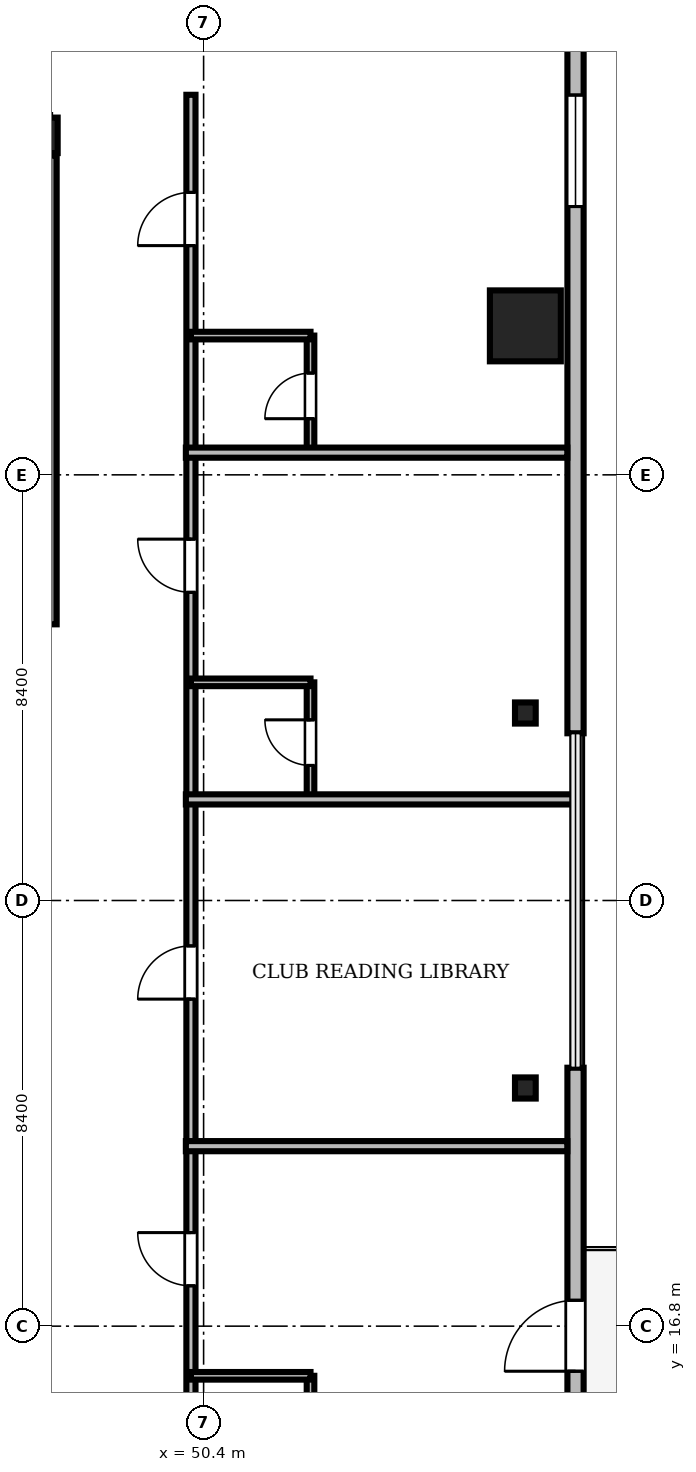
"""IFC4 building model, lengths in metres.
Left out: names, types, materials, properties, quantities, classifications, styles, units other than length and angle.
Written with IfcOpenShell. Run it as: python <this file> out.ifc"""

import sys

from ifc_helpers import new_model, si_unit, direction, frame, frame_2d, origin, origin_2d, place, context, subcontext, project, spatial, rectangle, i_section, extrude, source, transform, mapped, element, fill, save


model = new_model("IFC4")
c1 = context("Model", 3, precision=1e-05, world=origin(), true_north=direction((0.0, 1.0)))
c2 = subcontext(c1, "Body", "Model", "MODEL_VIEW")
j1 = project(units=[si_unit("LENGTHUNIT", "METRE"), si_unit("PLANEANGLEUNIT", "RADIAN")], contexts=[c1])
p1 = place(None, origin())
s1 = spatial("IfcSite", under=j1, at=p1, CompositionType="ELEMENT")
p2 = place(p1, origin())
s2 = spatial("IfcBuilding", under=s1, at=p2, CompositionType="ELEMENT")
p3 = place(p2, frame((0.0, 0.0, 214.8)))
s3 = spatial("IfcBuildingStorey", under=s2, at=p3, CompositionType="ELEMENT", Elevation=214.8)
m1 = source(origin(), c2, "Body", "SweptSolid", [
    extrude(i_section(OverallWidth=0.3, OverallDepth=0.7, WebThickness=0.017, FlangeThickness=0.032, FilletRadius=0.027, at=origin_2d()), origin(), (0.0, 0.0, 1.0), 3.53),
])
p4 = place(p3, frame((47.37, 40.3, 0.0), z_axis=(0.0, 0.0, 1.0), x_axis=(1.0, 0.0, 0.0)))
e1 = element("IfcColumn", 1, at=p4, inside=s3, PredefinedType="COLUMN", context=c2, shape_type="MappedRepresentation", body=[
    mapped(m1, transform((0.0, 0.0, 0.0), scale=1.0)),
])
m2 = source(origin(), c2, "Body", "SweptSolid", [
    extrude(rectangle(XDim=1.4, YDim=1.4, at=origin_2d()), origin(), (0.0, 0.0, 1.0), 3.53),
])
p5 = place(p3, frame((56.75, 36.54, 0.0), z_axis=(0.0, 0.0, 1.0), x_axis=(1.0, 0.0, 0.0)))
e2 = element("IfcColumn", 2, at=p5, inside=s3, PredefinedType="COLUMN", context=c2, shape_type="MappedRepresentation", body=[
    mapped(m2, transform((0.0, 0.0, 0.0), scale=1.0)),
])
m3 = source(origin(), c2, "Body", "SweptSolid", [
    extrude(i_section(OverallWidth=0.409, OverallDepth=0.417, WebThickness=0.021, FlangeThickness=0.033, FilletRadius=0.015, at=origin_2d()), origin(), (0.0, 0.0, 1.0), 3.53),
])
for number, where, z_axis, x_axis in (
    (3, (56.75, 21.5, 0.0), (0.0, 0.0, 1.0), (1.0, 0.0, 0.0)),
    (4, (56.75, 28.9, 0.0), (0.0, 0.0, 1.0), (1.0, 0.0, 0.0)),
):
    element("IfcColumn", number, at=place(p3, frame(where, z_axis=z_axis, x_axis=x_axis)), inside=s3, PredefinedType="COLUMN", context=c2, shape_type="MappedRepresentation", body=[
        mapped(m3, transform((0.0, 0.0, 0.0), scale=1.0)),
    ])
m4 = source(origin(), c2, "Body", "SweptSolid", [
    extrude(rectangle(XDim=15.6, YDim=0.32, at=frame_2d((7.8, 0.0))), origin(), (0.0, 0.0, 1.0), 3.53),
])
p6 = place(p3, frame((57.74, 6.3, 0.0), z_axis=(0.0, 0.0, 1.0), x_axis=(0.0, 1.0, 0.0)))
e5 = element("IfcWall", 5, at=p6, inside=s3, PredefinedType="SOLIDWALL", context=c2, shape_type="MappedRepresentation", body=[
    mapped(m4, transform((0.0, 0.0, 0.0), scale=1.0)),
])
m5 = source(origin(), c2, "Body", "SweptSolid", [
    extrude(rectangle(XDim=1.4, YDim=2.3, at=frame_2d((0.7, 1.15))), frame((0.0, 0.17, 0.0), z_axis=(0.0, -1.0, 0.0), x_axis=(1.0, 0.0, 0.0)), (0.0, 0.0, 1.0), 0.34),
])
p7 = place(p6, frame((9.61, 0.0, 0.0)))
e6 = element("IfcOpeningElement", 6, at=p7, cuts=e5, PredefinedType="OPENING", context=c2, shape_type="MappedRepresentation", body=[
    mapped(m5, transform((0.0, 0.0, 0.0), scale=1.0)),
])
m6 = source(origin(), c2, "Body", "SweptSolid", [
    extrude(rectangle(XDim=2.2, YDim=2.4, at=frame_2d((1.1, 1.2))), frame((0.0, 0.17, 0.0), z_axis=(0.0, -1.0, 0.0), x_axis=(1.0, 0.0, 0.0)), (0.0, 0.0, 1.0), 0.34),
])
p8 = place(p6, frame((3.005, 0.0, 0.72)))
e7 = element("IfcOpeningElement", 7, at=p8, cuts=e5, PredefinedType="OPENING", context=c2, shape_type="MappedRepresentation", body=[
    mapped(m6, transform((0.0, 0.0, 0.0), scale=1.0)),
])
m7 = source(origin(), c2, "Body", "SweptSolid", [
    extrude(rectangle(XDim=15.6, YDim=0.32, at=frame_2d((7.8, 0.0))), origin(), (0.0, 0.0, 1.0), 3.53),
])
p9 = place(p3, frame((57.74, 28.5, 0.0), z_axis=(0.0, 0.0, 1.0), x_axis=(0.0, 1.0, 0.0)))
e8 = element("IfcWall", 8, at=p9, inside=s3, PredefinedType="SOLIDWALL", context=c2, shape_type="MappedRepresentation", body=[
    mapped(m7, transform((0.0, 0.0, 0.0), scale=1.0)),
])
p10 = place(p9, frame((10.395, 0.0, 0.72)))
e9 = element("IfcOpeningElement", 9, at=p10, cuts=e8, PredefinedType="OPENING", context=c2, shape_type="MappedRepresentation", body=[
    mapped(m6, transform((0.0, 0.0, 0.0), scale=1.0)),
])
m8 = source(origin(), c2, "Body", "SweptSolid", [
    extrude(rectangle(XDim=9.25, YDim=0.25, at=frame_2d((4.625, 0.0))), origin(), (0.0, 0.0, 1.0), 3.55),
])
p11 = place(p3, frame((47.375, 30.65, 0.0), z_axis=(0.0, 0.0, 1.0), x_axis=(0.0, 1.0, 0.0)))
e10 = element("IfcWall", 10, at=p11, inside=s3, PredefinedType="SOLIDWALL", context=c2, shape_type="MappedRepresentation", body=[
    mapped(m8, transform((0.0, 0.0, 0.0), scale=1.0)),
])
m9 = source(origin(), c2, "Body", "SweptSolid", [
    extrude(rectangle(XDim=27.59, YDim=0.18, at=frame_2d((13.795, 0.0))), origin(), (0.0, 0.0, 1.0), 2.972),
])
p12 = place(p3, frame((50.15, 13.51, 0.0), z_axis=(0.0, 0.0, 1.0), x_axis=(0.0, 1.0, 0.0)))
e11 = element("IfcWall", 11, at=p12, inside=s3, PredefinedType="PARTITIONING", context=c2, shape_type="MappedRepresentation", body=[
    mapped(m9, transform((0.0, 0.0, 0.0), scale=1.0)),
])
m10 = source(origin(), c2, "Body", "SweptSolid", [
    extrude(rectangle(XDim=1.05, YDim=2.2, at=frame_2d((0.525, 1.1))), frame((0.0, 0.1, 0.0), z_axis=(0.0, -1.0, 0.0), x_axis=(1.0, 0.0, 0.0)), (0.0, 0.0, 1.0), 0.2),
])
p13 = place(p12, frame((4.086, 0.0, 0.0)))
e12 = element("IfcOpeningElement", 12, at=p13, cuts=e11, PredefinedType="OPENING", context=c2, shape_type="MappedRepresentation", body=[
    mapped(m10, transform((0.0, 0.0, 0.0), scale=1.0)),
])
p14 = place(p12, frame((9.744, 0.0, 0.0)))
e13 = element("IfcOpeningElement", 13, at=p14, cuts=e11, PredefinedType="OPENING", context=c2, shape_type="MappedRepresentation", body=[
    mapped(m10, transform((0.0, 0.0, 0.0), scale=1.0)),
])
p15 = place(p12, frame((17.771, 0.0, 0.0)))
e14 = element("IfcOpeningElement", 14, at=p15, cuts=e11, PredefinedType="OPENING", context=c2, shape_type="MappedRepresentation", body=[
    mapped(m10, transform((0.0, 0.0, 0.0), scale=1.0)),
])
p16 = place(p12, frame((24.614, 0.0, 0.0)))
e15 = element("IfcOpeningElement", 15, at=p16, cuts=e11, PredefinedType="OPENING", context=c2, shape_type="MappedRepresentation", body=[
    mapped(m10, transform((0.0, 0.0, 0.0), scale=1.0)),
])
m11 = source(origin(), c2, "Body", "SweptSolid", [
    extrude(rectangle(XDim=2.29, YDim=0.15, at=frame_2d((1.145, 0.0))), origin(), (0.0, 0.0, 1.0), 2.972),
])
p17 = place(p3, frame((52.51, 13.53, 0.0), z_axis=(0.0, 0.0, 1.0), x_axis=(0.0, 1.0, 0.0)))
e16 = element("IfcWall", 16, at=p17, inside=s3, PredefinedType="PARTITIONING", context=c2, shape_type="MappedRepresentation", body=[
    mapped(m11, transform((0.0, 0.0, 0.0), scale=1.0)),
])
m12 = source(origin(), c2, "Body", "SweptSolid", [
    extrude(rectangle(XDim=0.9, YDim=2.1, at=frame_2d((0.45, 1.05))), frame((0.0, 0.085, 0.0), z_axis=(0.0, -1.0, 0.0), x_axis=(1.0, 0.0, 0.0)), (0.0, 0.0, 1.0), 0.17),
])
p18 = place(p17, frame((0.65, 0.0, 0.0)))
e17 = element("IfcOpeningElement", 17, at=p18, cuts=e16, PredefinedType="OPENING", context=c2, shape_type="MappedRepresentation", body=[
    mapped(m12, transform((0.0, 0.0, 0.0), scale=1.0)),
])
m13 = source(origin(), c2, "Body", "SweptSolid", [
    extrude(rectangle(XDim=2.29, YDim=0.15, at=frame_2d((1.145, 0.0))), origin(), (0.0, 0.0, 1.0), 2.972),
])
p19 = place(p3, frame((52.51, 27.215, 0.0), z_axis=(0.0, 0.0, 1.0), x_axis=(0.0, 1.0, 0.0)))
e18 = element("IfcWall", 18, at=p19, inside=s3, PredefinedType="PARTITIONING", context=c2, shape_type="MappedRepresentation", body=[
    mapped(m13, transform((0.0, 0.0, 0.0), scale=1.0)),
])
p20 = place(p19, frame((0.65, 0.0, 0.0)))
e19 = element("IfcOpeningElement", 19, at=p20, cuts=e18, PredefinedType="OPENING", context=c2, shape_type="MappedRepresentation", body=[
    mapped(m12, transform((0.0, 0.0, 0.0), scale=1.0)),
])
m14 = source(origin(), c2, "Body", "SweptSolid", [
    extrude(rectangle(XDim=2.29, YDim=0.15, at=frame_2d((1.145, 0.0))), origin(), (0.0, 0.0, 1.0), 3.53),
])
p21 = place(p3, frame((52.51, 34.058, 0.0), z_axis=(0.0, 0.0, 1.0), x_axis=(0.0, 1.0, 0.0)))
e20 = element("IfcWall", 20, at=p21, inside=s3, PredefinedType="PARTITIONING", context=c2, shape_type="MappedRepresentation", body=[
    mapped(m14, transform((0.0, 0.0, 0.0), scale=1.0)),
])
p22 = place(p21, frame((0.65, 0.0, 0.0)))
e21 = element("IfcOpeningElement", 21, at=p22, cuts=e20, PredefinedType="OPENING", context=c2, shape_type="MappedRepresentation", body=[
    mapped(m12, transform((0.0, 0.0, 0.0), scale=1.0)),
])
m15 = source(origin(), c2, "Body", "SweptSolid", [
    extrude(rectangle(XDim=7.528, YDim=0.2, at=frame_2d((3.764, 0.0))), origin(), (0.0, 0.0, 1.0), 2.772),
])
p23 = place(p3, frame((50.05, 20.352, 0.0), z_axis=(0.0, 0.0, 1.0), x_axis=(1.0, 0.0, 0.0)))
e22 = element("IfcWall", 22, at=p23, inside=s3, PredefinedType="PARTITIONING", context=c2, shape_type="MappedRepresentation", body=[
    mapped(m15, transform((0.0, 0.0, 0.0), scale=1.0)),
])
m16 = source(origin(), c2, "Body", "SweptSolid", [
    extrude(rectangle(XDim=7.72, YDim=0.2, at=frame_2d((3.86, 0.0))), origin(), (0.0, 0.0, 1.0), 2.772),
])
p24 = place(p3, frame((50.05, 27.195, 0.0), z_axis=(0.0, 0.0, 1.0), x_axis=(1.0, 0.0, 0.0)))
e23 = element("IfcWall", 23, at=p24, inside=s3, PredefinedType="PARTITIONING", context=c2, shape_type="MappedRepresentation", body=[
    mapped(m16, transform((0.0, 0.0, 0.0), scale=1.0)),
])
p25 = place(p3, frame((50.05, 34.038, 0.0), z_axis=(0.0, 0.0, 1.0), x_axis=(1.0, 0.0, 0.0)))
e24 = element("IfcWall", 24, at=p25, inside=s3, PredefinedType="PARTITIONING", context=c2, shape_type="MappedRepresentation", body=[
    mapped(m15, transform((0.0, 0.0, 0.0), scale=1.0)),
])
m17 = source(origin(), c2, "Body", "SweptSolid", [
    extrude(rectangle(XDim=2.36, YDim=0.15, at=frame_2d((1.18, 0.0))), origin(), (0.0, 0.0, 1.0), 3.53),
])
for number, where, z_axis, x_axis in (
    (25, (50.15, 15.82, 0.0), (0.0, 0.0, 1.0), (1.0, 0.0, 0.0)),
    (26, (50.15, 29.505, 0.0), (0.0, 0.0, 1.0), (1.0, 0.0, 0.0)),
    (27, (50.15, 36.348, 0.0), (0.0, 0.0, 1.0), (1.0, 0.0, 0.0)),
):
    element("IfcWall", number, at=place(p3, frame(where, z_axis=z_axis, x_axis=x_axis)), inside=s3, PredefinedType="PARTITIONING", context=c2, shape_type="MappedRepresentation", body=[
        mapped(m17, transform((0.0, 0.0, 0.0), scale=1.0)),
    ])
m18 = source(origin(), c2, "Body", "SweptSolid", [
    extrude(rectangle(XDim=1.4, YDim=2.3, at=frame_2d((0.7, 1.15))), frame((0.0, 0.025, 0.0), z_axis=(0.0, -1.0, 0.0), x_axis=(1.0, 0.0, 0.0)), (0.0, 0.0, 1.0), 0.05),
])
p26 = place(p7, frame((1.4, 0.0, 0.0), z_axis=(0.0, 0.0, 1.0), x_axis=(-1.0, 0.0, 0.0)))
e28 = element("IfcDoor", 28, at=p26, inside=s3, OperationType="DOUBLE_DOOR_SLIDING", PredefinedType="DOOR", context=c2, shape_type="MappedRepresentation", body=[
    mapped(m18, transform((0.0, 0.0, 0.0), scale=1.0)),
])
fill(e6, e28)
m19 = source(origin(), c2, "Body", "SweptSolid", [
    extrude(rectangle(XDim=2.2, YDim=2.4, at=frame_2d((1.1, 1.2))), frame((0.0, 0.03, 0.0), z_axis=(0.0, -1.0, 0.0), x_axis=(1.0, 0.0, 0.0)), (0.0, 0.0, 1.0), 0.06),
])
p27 = place(p10, origin())
e29 = element("IfcWindow", 29, at=p27, inside=s3, PartitioningType="SINGLE_PANEL", PredefinedType="WINDOW", context=c2, shape_type="MappedRepresentation", body=[
    mapped(m19, transform((0.0, 0.0, 0.0), scale=1.0)),
])
fill(e9, e29)
m20 = source(origin(), c2, "Body", "SweptSolid", [
    extrude(rectangle(XDim=1.05, YDim=2.2, at=frame_2d((0.525, 1.1))), frame((0.0, 0.025, 0.0), z_axis=(0.0, -1.0, 0.0), x_axis=(1.0, 0.0, 0.0)), (0.0, 0.0, 1.0), 0.05),
])
p28 = place(p13, origin())
e30 = element("IfcDoor", 30, at=p28, inside=s3, OperationType="SINGLE_SWING_RIGHT", PredefinedType="DOOR", context=c2, shape_type="MappedRepresentation", body=[
    mapped(m20, transform((0.0, 0.0, 0.0), scale=1.0)),
])
fill(e12, e30)
p29 = place(p14, origin())
e31 = element("IfcDoor", 31, at=p29, inside=s3, OperationType="SINGLE_SWING_LEFT", PredefinedType="DOOR", context=c2, shape_type="MappedRepresentation", body=[
    mapped(m20, transform((0.0, 0.0, 0.0), scale=1.0)),
])
fill(e13, e31)
p30 = place(p15, origin())
e32 = element("IfcDoor", 32, at=p30, inside=s3, OperationType="SINGLE_SWING_RIGHT", PredefinedType="DOOR", context=c2, shape_type="MappedRepresentation", body=[
    mapped(m20, transform((0.0, 0.0, 0.0), scale=1.0)),
])
fill(e14, e32)
p31 = place(p16, origin())
e33 = element("IfcDoor", 33, at=p31, inside=s3, OperationType="SINGLE_SWING_LEFT", PredefinedType="DOOR", context=c2, shape_type="MappedRepresentation", body=[
    mapped(m20, transform((0.0, 0.0, 0.0), scale=1.0)),
])
fill(e15, e33)
m21 = source(origin(), c2, "Body", "SweptSolid", [
    extrude(rectangle(XDim=0.9, YDim=2.1, at=frame_2d((0.45, 1.05))), frame((0.0, 0.025, 0.0), z_axis=(0.0, -1.0, 0.0), x_axis=(1.0, 0.0, 0.0)), (0.0, 0.0, 1.0), 0.05),
])
p32 = place(p20, origin())
e34 = element("IfcDoor", 34, at=p32, inside=s3, OperationType="SINGLE_SWING_RIGHT", PredefinedType="DOOR", context=c2, shape_type="MappedRepresentation", body=[
    mapped(m21, transform((0.0, 0.0, 0.0), scale=1.0)),
])
fill(e19, e34)
p33 = place(p22, origin())
e35 = element("IfcDoor", 35, at=p33, inside=s3, OperationType="SINGLE_SWING_LEFT", PredefinedType="DOOR", context=c2, shape_type="MappedRepresentation", body=[
    mapped(m21, transform((0.0, 0.0, 0.0), scale=1.0)),
])
fill(e21, e35)
save(model, sys.argv[1])
